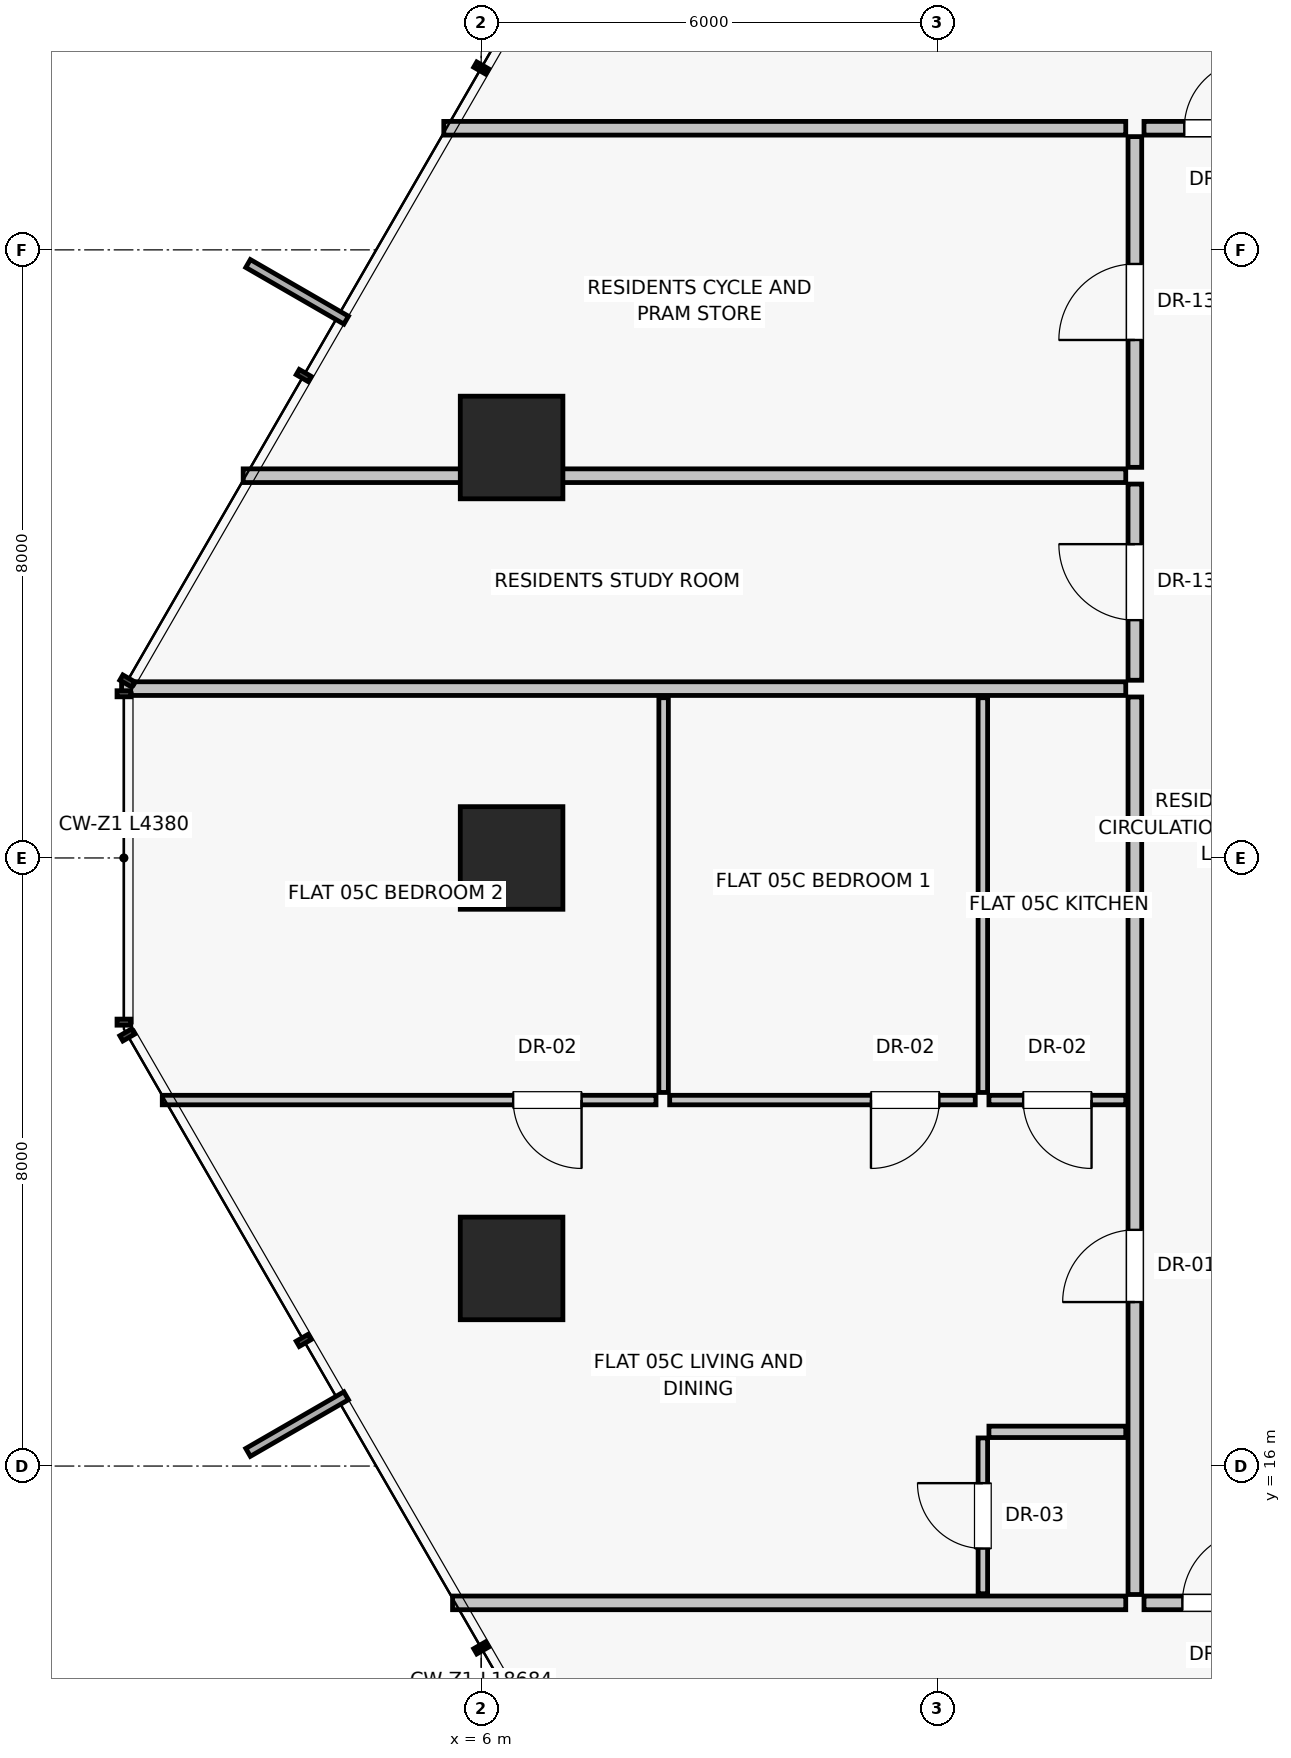
"""IFC4 building model, lengths in metres.
Left out: names, types, materials, properties, quantities, classifications, styles, units other than length and angle.
Written with IfcOpenShell. Run it as: python <this file> out.ifc"""

import sys

from ifc_helpers import new_model, si_unit, direction, frame, frame_2d, origin, origin_2d, place, context, subcontext, project, spatial, rectangle, extrude, source, transform, mapped, element, fill, save


model = new_model("IFC4")
c1 = context("Model", 3, precision=1e-05, world=origin(), true_north=direction((0.0, 1.0)))
c2 = subcontext(c1, "Body", "Model", "MODEL_VIEW")
j1 = project(units=[si_unit("LENGTHUNIT", "METRE"), si_unit("PLANEANGLEUNIT", "RADIAN")], contexts=[c1])
p1 = place(None, origin())
s1 = spatial("IfcSite", under=j1, at=p1, CompositionType="ELEMENT")
p2 = place(p1, origin())
s2 = spatial("IfcBuilding", under=s1, at=p2, CompositionType="ELEMENT")
p3 = place(p2, frame((0.0, 0.0, 22.8)))
s3 = spatial("IfcBuildingStorey", under=s2, at=p3, CompositionType="ELEMENT", Elevation=22.8)
p4 = place(p3, frame((6.4, 29.4, 0.0), z_axis=(0.0, 0.0, 1.0), x_axis=(1.0, 0.0, 0.0)))
e1 = element("IfcColumn", 1, at=p4, inside=s3, PredefinedType="COLUMN", context=c2, shape_type="SweptSolid", body=[
    extrude(rectangle(XDim=1.35, YDim=1.35, at=origin_2d()), origin(), (0.0, 0.0, 1.0), 4.5),
])
p5 = place(p3, frame((6.4, 24.0, -0.35), z_axis=(0.0, 0.0, 1.0), x_axis=(1.0, 0.0, 0.0)))
e2 = element("IfcColumn", 2, at=p5, inside=s3, PredefinedType="COLUMN", context=c2, shape_type="SweptSolid", body=[
    extrude(rectangle(XDim=1.35, YDim=1.35, at=origin_2d()), origin(), (0.0, 0.0, 1.0), 4.85),
])
p6 = place(p3, frame((6.4, 18.6, 0.0), z_axis=(0.0, 0.0, 1.0), x_axis=(1.0, 0.0, 0.0)))
e3 = element("IfcColumn", 3, at=p6, inside=s3, PredefinedType="COLUMN", context=c2, shape_type="SweptSolid", body=[
    extrude(rectangle(XDim=1.35, YDim=1.35, at=origin_2d()), origin(), (0.0, 0.0, 1.0), 4.5),
])
p7 = place(p3, frame((14.48, 14.2, 0.0), z_axis=(0.0, 0.0, 1.0), x_axis=(-1.0, 0.0, 0.0)))
e4 = element("IfcWall", 4, at=p7, inside=s3, PredefinedType="PARTITIONING", context=c2, shape_type="SweptSolid", body=[
    extrude(rectangle(XDim=8.857, YDim=0.18, at=frame_2d((4.428, 0.0))), origin(), (0.0, 0.0, 1.0), 4.25),
])
p8 = place(p3, frame((14.48, 33.6, 0.0), z_axis=(0.0, 0.0, 1.0), x_axis=(-1.0, 0.0, 0.0)))
e5 = element("IfcWall", 5, at=p8, inside=s3, PredefinedType="PARTITIONING", context=c2, shape_type="SweptSolid", body=[
    extrude(rectangle(XDim=8.972, YDim=0.18, at=frame_2d((4.486, 0.0))), origin(), (0.0, 0.0, 1.0), 4.25),
])
p9 = place(p3, frame((14.6, 14.31, 0.0), z_axis=(0.0, 0.0, 1.0), x_axis=(0.0, 1.0, 0.0)))
e6 = element("IfcWall", 6, at=p9, inside=s3, PredefinedType="PARTITIONING", context=c2, shape_type="SweptSolid", body=[
    extrude(rectangle(XDim=11.808, YDim=0.18, at=frame_2d((5.904, 0.0))), origin(), (0.0, 0.0, 1.0), 4.25),
])
p10 = place(p9, frame((3.847, 0.0, 0.0)))
e7 = element("IfcOpeningElement", 7, at=p10, cuts=e6, PredefinedType="OPENING", context=c2, shape_type="SweptSolid", body=[
    extrude(rectangle(XDim=0.95, YDim=2.02, at=frame_2d((0.475, 1.01))), frame((0.0, 0.1, 0.0), z_axis=(0.0, -1.0, 0.0), x_axis=(1.0, 0.0, 0.0)), (0.0, 0.0, 1.0), 0.2),
])
p11 = place(p3, frame((14.48, 16.45, 0.0), z_axis=(0.0, 0.0, 1.0), x_axis=(-1.0, 0.0, 0.0)))
e8 = element("IfcWall", 8, at=p11, inside=s3, PredefinedType="PARTITIONING", context=c2, shape_type="SweptSolid", body=[
    extrude(rectangle(XDim=1.8, YDim=0.15, at=frame_2d((0.9, 0.0))), origin(), (0.0, 0.0, 1.0), 4.25),
])
p12 = place(p3, frame((12.6, 14.32, 0.0), z_axis=(0.0, 0.0, 1.0), x_axis=(0.0, 1.0, 0.0)))
e9 = element("IfcWall", 9, at=p12, inside=s3, PredefinedType="PARTITIONING", context=c2, shape_type="SweptSolid", body=[
    extrude(rectangle(XDim=2.05, YDim=0.125, at=frame_2d((1.025, 0.0))), origin(), (0.0, 0.0, 1.0), 4.25),
])
p13 = place(p12, frame((0.595, 0.0, 0.0)))
e10 = element("IfcOpeningElement", 10, at=p13, cuts=e9, PredefinedType="OPENING", context=c2, shape_type="SweptSolid", body=[
    extrude(rectangle(XDim=0.86, YDim=2.01, at=frame_2d((0.43, 1.005))), frame((0.0, 0.073, 0.0), z_axis=(0.0, -1.0, 0.0), x_axis=(1.0, 0.0, 0.0)), (0.0, 0.0, 1.0), 0.145),
])
p14 = place(p3, frame((14.48, 20.815, 0.0), z_axis=(0.0, 0.0, 1.0), x_axis=(-1.0, 0.0, 0.0)))
e11 = element("IfcWall", 11, at=p14, inside=s3, PredefinedType="PARTITIONING", context=c2, shape_type="SweptSolid", body=[
    extrude(rectangle(XDim=1.8, YDim=0.125, at=frame_2d((0.9, 0.0))), origin(), (0.0, 0.0, 1.0), 4.25),
])
p15 = place(p14, frame((0.45, 0.0, 0.0)))
e12 = element("IfcOpeningElement", 12, at=p15, cuts=e11, PredefinedType="OPENING", context=c2, shape_type="SweptSolid", body=[
    extrude(rectangle(XDim=0.9, YDim=2.01, at=frame_2d((0.45, 1.005))), frame((0.0, 0.073, 0.0), z_axis=(0.0, -1.0, 0.0), x_axis=(1.0, 0.0, 0.0)), (0.0, 0.0, 1.0), 0.145),
])
for number, where, z_axis, x_axis in (
    (13, (12.6, 20.915, 0.0), (0.0, 0.0, 1.0), (0.0, 1.0, 0.0)),
    (14, (8.4, 20.915, 0.0), (0.0, 0.0, 1.0), (0.0, 1.0, 0.0)),
):
    element("IfcWall", number, at=place(p3, frame(where, z_axis=z_axis, x_axis=x_axis)), inside=s3, PredefinedType="PARTITIONING", context=c2, shape_type="SweptSolid", body=[
        extrude(rectangle(XDim=5.193, YDim=0.125, at=frame_2d((2.596, 0.0))), origin(), (0.0, 0.0, 1.0), 4.25),
    ])
p16 = place(p3, frame((12.5, 20.815, 0.0), z_axis=(0.0, 0.0, 1.0), x_axis=(-1.0, 0.0, 0.0)))
e15 = element("IfcWall", 15, at=p16, inside=s3, PredefinedType="PARTITIONING", context=c2, shape_type="SweptSolid", body=[
    extrude(rectangle(XDim=4.02, YDim=0.125, at=frame_2d((2.01, 0.0))), origin(), (0.0, 0.0, 1.0), 4.25),
])
p17 = place(p16, frame((0.472, 0.0, 0.0)))
e16 = element("IfcOpeningElement", 16, at=p17, cuts=e15, PredefinedType="OPENING", context=c2, shape_type="SweptSolid", body=[
    extrude(rectangle(XDim=0.9, YDim=2.01, at=frame_2d((0.45, 1.005))), frame((0.0, 0.073, 0.0), z_axis=(0.0, -1.0, 0.0), x_axis=(1.0, 0.0, 0.0)), (0.0, 0.0, 1.0), 0.145),
])
p18 = place(p3, frame((8.3, 20.815, 0.0), z_axis=(0.0, 0.0, 1.0), x_axis=(-1.0, 0.0, 0.0)))
e17 = element("IfcWall", 17, at=p18, inside=s3, PredefinedType="PARTITIONING", context=c2, shape_type="SweptSolid", body=[
    extrude(rectangle(XDim=6.496, YDim=0.125, at=frame_2d((3.248, 0.0))), origin(), (0.0, 0.0, 1.0), 4.25),
])
p19 = place(p18, frame((0.979, 0.0, 0.0)))
e18 = element("IfcOpeningElement", 18, at=p19, cuts=e17, PredefinedType="OPENING", context=c2, shape_type="SweptSolid", body=[
    extrude(rectangle(XDim=0.9, YDim=2.01, at=frame_2d((0.45, 1.005))), frame((0.0, 0.073, 0.0), z_axis=(0.0, -1.0, 0.0), x_axis=(1.0, 0.0, 0.0)), (0.0, 0.0, 1.0), 0.145),
])
p20 = place(p3, frame((14.48, 26.228, 0.0), z_axis=(0.0, 0.0, 1.0), x_axis=(-1.0, 0.0, 0.0)))
e19 = element("IfcWall", 19, at=p20, inside=s3, PredefinedType="PARTITIONING", context=c2, shape_type="SweptSolid", body=[
    extrude(rectangle(XDim=13.211, YDim=0.18, at=frame_2d((6.605, 0.0))), origin(), (0.0, 0.0, 1.0), 4.25),
])
p21 = place(p3, frame((14.6, 26.338, 0.0), z_axis=(0.0, 0.0, 1.0), x_axis=(0.0, 1.0, 0.0)))
e20 = element("IfcWall", 20, at=p21, inside=s3, PredefinedType="PARTITIONING", context=c2, shape_type="SweptSolid", body=[
    extrude(rectangle(XDim=2.581, YDim=0.18, at=frame_2d((1.291, 0.0))), origin(), (0.0, 0.0, 1.0), 4.25),
])
p22 = place(p21, frame((0.791, 0.0, 0.0)))
e21 = element("IfcOpeningElement", 21, at=p22, cuts=e20, PredefinedType="OPENING", context=c2, shape_type="SweptSolid", body=[
    extrude(rectangle(XDim=1.0, YDim=2.01, at=frame_2d((0.5, 1.005))), frame((0.0, 0.1, 0.0), z_axis=(0.0, -1.0, 0.0), x_axis=(1.0, 0.0, 0.0)), (0.0, 0.0, 1.0), 0.2),
])
p23 = place(p3, frame((14.6, 29.139, 0.0), z_axis=(0.0, 0.0, 1.0), x_axis=(0.0, 1.0, 0.0)))
e22 = element("IfcWall", 22, at=p23, inside=s3, PredefinedType="PARTITIONING", context=c2, shape_type="SweptSolid", body=[
    extrude(rectangle(XDim=4.351, YDim=0.18, at=frame_2d((2.176, 0.0))), origin(), (0.0, 0.0, 1.0), 4.25),
])
p24 = place(p23, frame((1.676, 0.0, 0.0)))
e23 = element("IfcOpeningElement", 23, at=p24, cuts=e22, PredefinedType="OPENING", context=c2, shape_type="SweptSolid", body=[
    extrude(rectangle(XDim=1.0, YDim=2.01, at=frame_2d((0.5, 1.005))), frame((0.0, 0.1, 0.0), z_axis=(0.0, -1.0, 0.0), x_axis=(1.0, 0.0, 0.0)), (0.0, 0.0, 1.0), 0.2),
])
p25 = place(p3, frame((14.48, 29.029, 0.0), z_axis=(0.0, 0.0, 1.0), x_axis=(-1.0, 0.0, 0.0)))
e24 = element("IfcWall", 24, at=p25, inside=s3, PredefinedType="PARTITIONING", context=c2, shape_type="SweptSolid", body=[
    extrude(rectangle(XDim=11.611, YDim=0.18, at=frame_2d((5.806, 0.0))), origin(), (0.0, 0.0, 1.0), 3.549),
])
p26 = place(p3, frame((14.72, 14.2, 0.0), z_axis=(0.0, 0.0, 1.0), x_axis=(1.0, 0.0, 0.0)))
e25 = element("IfcWall", 25, at=p26, inside=s3, PredefinedType="PARTITIONING", context=c2, shape_type="SweptSolid", body=[
    extrude(rectangle(XDim=1.96, YDim=0.18, at=frame_2d((0.98, 0.0))), origin(), (0.0, 0.0, 1.0), 4.25),
])
p27 = place(p26, frame((0.505, 0.0, 0.0)))
e26 = element("IfcOpeningElement", 26, at=p27, cuts=e25, PredefinedType="OPENING", context=c2, shape_type="SweptSolid", body=[
    extrude(rectangle(XDim=0.95, YDim=2.02, at=frame_2d((0.475, 1.01))), frame((0.0, 0.1, 0.0), z_axis=(0.0, -1.0, 0.0), x_axis=(1.0, 0.0, 0.0)), (0.0, 0.0, 1.0), 0.2),
])
p28 = place(p3, frame((14.72, 33.6, 0.0), z_axis=(0.0, 0.0, 1.0), x_axis=(1.0, 0.0, 0.0)))
e27 = element("IfcWall", 27, at=p28, inside=s3, PredefinedType="PARTITIONING", context=c2, shape_type="SweptSolid", body=[
    extrude(rectangle(XDim=1.96, YDim=0.18, at=frame_2d((0.98, 0.0))), origin(), (0.0, 0.0, 1.0), 4.25),
])
p29 = place(p28, frame((0.53, 0.0, 0.0)))
e28 = element("IfcOpeningElement", 28, at=p29, cuts=e27, PredefinedType="OPENING", context=c2, shape_type="SweptSolid", body=[
    extrude(rectangle(XDim=0.9, YDim=2.01, at=frame_2d((0.45, 1.005))), frame((0.0, 0.1, 0.0), z_axis=(0.0, -1.0, 0.0), x_axis=(1.0, 0.0, 0.0)), (0.0, 0.0, 1.0), 0.2),
])
m1 = source(origin(), c2, "Body", "SweptSolid", [
    extrude(rectangle(XDim=0.95, YDim=2.02, at=frame_2d((0.475, 1.01))), frame((0.0, 0.025, 0.0), z_axis=(0.0, -1.0, 0.0), x_axis=(1.0, 0.0, 0.0)), (0.0, 0.0, 1.0), 0.05),
])
p30 = place(p10, origin())
e29 = element("IfcDoor", 29, at=p30, inside=s3, OperationType="SINGLE_SWING_LEFT", PredefinedType="DOOR", context=c2, shape_type="MappedRepresentation", body=[
    mapped(m1, transform((0.0, 0.0, 0.0), scale=1.0)),
])
fill(e7, e29)
m2 = source(origin(), c2, "Body", "SweptSolid", [
    extrude(rectangle(XDim=0.86, YDim=2.01, at=frame_2d((0.43, 1.005))), frame((0.0, 0.025, 0.0), z_axis=(0.0, -1.0, 0.0), x_axis=(1.0, 0.0, 0.0)), (0.0, 0.0, 1.0), 0.05),
])
p31 = place(p13, origin())
e30 = element("IfcDoor", 30, at=p31, inside=s3, OperationType="SINGLE_SWING_RIGHT", PredefinedType="DOOR", context=c2, shape_type="MappedRepresentation", body=[
    mapped(m2, transform((0.0, 0.0, 0.0), scale=1.0)),
])
fill(e10, e30)
m3 = source(origin(), c2, "Body", "SweptSolid", [
    extrude(rectangle(XDim=0.9, YDim=2.01, at=frame_2d((0.45, 1.005))), frame((0.0, 0.025, 0.0), z_axis=(0.0, -1.0, 0.0), x_axis=(1.0, 0.0, 0.0)), (0.0, 0.0, 1.0), 0.05),
])
p32 = place(p15, origin())
e31 = element("IfcDoor", 31, at=p32, inside=s3, OperationType="SINGLE_SWING_LEFT", PredefinedType="DOOR", context=c2, shape_type="MappedRepresentation", body=[
    mapped(m3, transform((0.0, 0.0, 0.0), scale=1.0)),
])
fill(e12, e31)
p33 = place(p17, origin())
e32 = element("IfcDoor", 32, at=p33, inside=s3, OperationType="SINGLE_SWING_RIGHT", PredefinedType="DOOR", context=c2, shape_type="MappedRepresentation", body=[
    mapped(m3, transform((0.0, 0.0, 0.0), scale=1.0)),
])
fill(e16, e32)
p34 = place(p19, origin())
e33 = element("IfcDoor", 33, at=p34, inside=s3, OperationType="SINGLE_SWING_LEFT", PredefinedType="DOOR", context=c2, shape_type="MappedRepresentation", body=[
    mapped(m3, transform((0.0, 0.0, 0.0), scale=1.0)),
])
fill(e18, e33)
m4 = source(origin(), c2, "Body", "SweptSolid", [
    extrude(rectangle(XDim=1.0, YDim=2.01, at=frame_2d((0.5, 1.005))), frame((0.0, 0.025, 0.0), z_axis=(0.0, -1.0, 0.0), x_axis=(1.0, 0.0, 0.0)), (0.0, 0.0, 1.0), 0.05),
])
p35 = place(p22, origin())
e34 = element("IfcDoor", 34, at=p35, inside=s3, OperationType="SINGLE_SWING_RIGHT", PredefinedType="DOOR", context=c2, shape_type="MappedRepresentation", body=[
    mapped(m4, transform((0.0, 0.0, 0.0), scale=1.0)),
])
fill(e21, e34)
p36 = place(p24, origin())
e35 = element("IfcDoor", 35, at=p36, inside=s3, OperationType="SINGLE_SWING_LEFT", PredefinedType="DOOR", context=c2, shape_type="MappedRepresentation", body=[
    mapped(m4, transform((0.0, 0.0, 0.0), scale=1.0)),
])
fill(e23, e35)
p37 = place(p27, origin())
e36 = element("IfcDoor", 36, at=p37, inside=s3, OperationType="SINGLE_SWING_RIGHT", PredefinedType="DOOR", context=c2, shape_type="MappedRepresentation", body=[
    mapped(m1, transform((0.0, 0.0, 0.0), scale=1.0)),
])
fill(e26, e36)
p38 = place(p29, origin())
e37 = element("IfcDoor", 37, at=p38, inside=s3, OperationType="SINGLE_SWING_RIGHT", PredefinedType="DOOR", context=c2, shape_type="MappedRepresentation", body=[
    mapped(m3, transform((0.0, 0.0, 0.0), scale=1.0)),
])
fill(e28, e37)
save(model, sys.argv[1])
